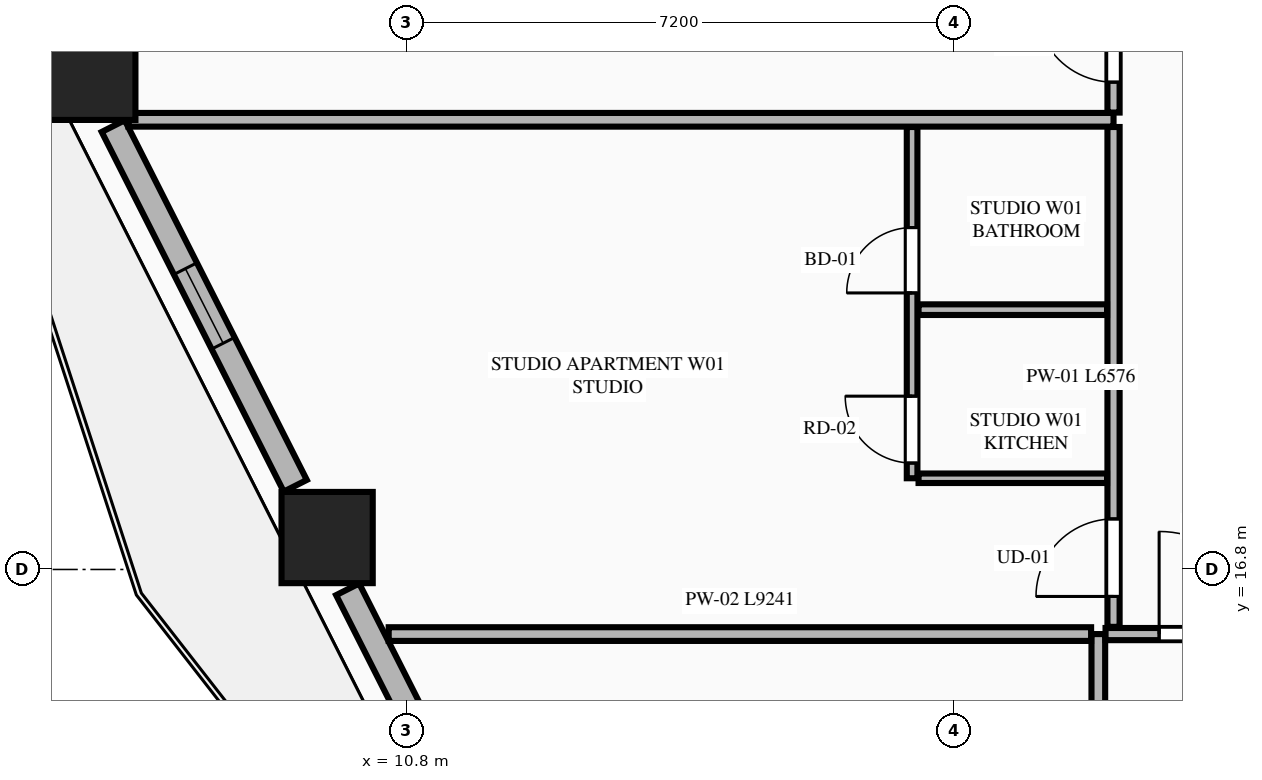
"""IFC4 building model, lengths in metres.
Left out: names, types, materials, properties, quantities, classifications, styles, units other than length and angle.
Written with IfcOpenShell. Run it as: python <this file> out.ifc"""

import sys

from ifc_helpers import new_model, si_unit, direction, frame, frame_2d, origin, origin_2d, place, context, subcontext, project, spatial, rectangle, extrude, element, fill, save


model = new_model("IFC4")
c1 = context("Model", 3, precision=1e-05, world=origin(), true_north=direction((0.0, 1.0)))
c2 = subcontext(c1, "Body", "Model", "MODEL_VIEW")
j1 = project(units=[si_unit("LENGTHUNIT", "METRE"), si_unit("PLANEANGLEUNIT", "RADIAN")], contexts=[c1])
p1 = place(None, origin())
s1 = spatial("IfcSite", under=j1, at=p1, CompositionType="ELEMENT")
p2 = place(p1, origin())
s2 = spatial("IfcBuilding", under=s1, at=p2, CompositionType="ELEMENT")
p3 = place(p2, frame((0.0, 0.0, 67.5)))
s3 = spatial("IfcBuildingStorey", under=s2, at=p3, CompositionType="ELEMENT", Elevation=67.5)
for number, where, z_axis, x_axis in (
    (1, (6.632, 23.314, 0.0), (0.0, 0.0, 1.0), (1.0, 0.0, 0.0)),
    (2, (9.754, 17.22, 0.0), (0.0, 0.0, 1.0), (1.0, 0.0, 0.0)),
):
    element("IfcColumn", number, at=place(p3, frame(where, z_axis=z_axis, x_axis=x_axis)), inside=s3, PredefinedType="COLUMN", context=c2, shape_type="SweptSolid", body=[
        extrude(rectangle(XDim=1.2, YDim=1.2, at=origin_2d()), origin(), (0.0, 0.0, 1.0), 3.55),
    ])
p4 = place(p3, frame((6.94, 22.633, 0.0), z_axis=(0.0, 0.0, 1.0), x_axis=(0.451572088722, -0.892234637686, 0.0)))
e3 = element("IfcWall", 3, at=p4, inside=s3, PredefinedType="STANDARD", context=c2, shape_type="SweptSolid", body=[
    extrude(rectangle(XDim=5.304, YDim=0.34, at=frame_2d((2.652, 0.0))), origin(), (0.0, 0.0, 1.0), 2.787),
])
p5 = place(p4, frame((2.102, 0.0, 0.75)))
e4 = element("IfcOpeningElement", 4, at=p5, cuts=e3, PredefinedType="OPENING", context=c2, shape_type="SweptSolid", body=[
    extrude(rectangle(XDim=1.1, YDim=1.887, at=frame_2d((0.55, 0.943))), frame((0.0, 0.18, 0.0), z_axis=(0.0, -1.0, 0.0), x_axis=(1.0, 0.0, 0.0)), (0.0, 0.0, 1.0), 0.36),
])
p6 = place(p3, frame((10.024, 16.539, 0.0), z_axis=(0.0, 0.0, 1.0), x_axis=(0.451627137896, -0.892206774417, 0.0)))
e5 = element("IfcWall", 5, at=p6, inside=s3, PredefinedType="STANDARD", context=c2, shape_type="SweptSolid", body=[
    extrude(rectangle(XDim=5.547, YDim=0.34, at=frame_2d((2.773, 0.0))), origin(), (0.0, 0.0, 1.0), 2.787),
])
p7 = place(p6, frame((2.679, 0.0, 0.0)))
e6 = element("IfcOpeningElement", 6, at=p7, cuts=e5, PredefinedType="OPENING", context=c2, shape_type="SweptSolid", body=[
    extrude(rectangle(XDim=1.1, YDim=2.25, at=frame_2d((0.55, 1.125))), frame((0.0, 0.18, 0.0), z_axis=(0.0, -1.0, 0.0), x_axis=(1.0, 0.0, 0.0)), (0.0, 0.0, 1.0), 0.36),
])
p8 = place(p3, frame((19.9, 2.455, 0.0), z_axis=(0.0, 0.0, 1.0), x_axis=(0.0, 1.0, 0.0)))
e7 = element("IfcWall", 7, at=p8, inside=s3, PredefinedType="PARTITIONING", context=c2, shape_type="SweptSolid", body=[
    extrude(rectangle(XDim=13.495, YDim=0.18, at=frame_2d((6.748, 0.0))), origin(), (0.0, 0.0, 1.0), 3.33),
])
p9 = place(p3, frame((19.995, 15.95, 0.0), z_axis=(0.0, 0.0, 1.0), x_axis=(1.0, 0.0, 0.0)))
e8 = element("IfcWall", 8, at=p9, inside=s3, PredefinedType="PARTITIONING", context=c2, shape_type="SweptSolid", body=[
    extrude(rectangle(XDim=24.81, YDim=0.16, at=frame_2d((12.405, 0.0))), origin(), (0.0, 0.0, 1.0), 3.33),
])
p10 = place(p9, frame((0.705, 0.0, 0.0)))
e9 = element("IfcOpeningElement", 9, at=p10, cuts=e8, PredefinedType="OPENING", context=c2, shape_type="SweptSolid", body=[
    extrude(rectangle(XDim=1.35, YDim=2.35, at=frame_2d((0.675, 1.175))), frame((0.0, 0.09, 0.0), z_axis=(0.0, -1.0, 0.0), x_axis=(1.0, 0.0, 0.0)), (0.0, 0.0, 1.0), 0.18),
])
p11 = place(p3, frame((10.564, 15.95, 0.0), z_axis=(0.0, 0.0, 1.0), x_axis=(1.0, 0.0, 0.0)))
e10 = element("IfcWall", 10, at=p11, inside=s3, PredefinedType="PARTITIONING", context=c2, shape_type="SweptSolid", body=[
    extrude(rectangle(XDim=9.241, YDim=0.18, at=frame_2d((4.621, 0.0))), origin(), (0.0, 0.0, 1.0), 3.33),
])
p12 = place(p3, frame((20.1, 16.045, 0.0), z_axis=(0.0, 0.0, 1.0), x_axis=(0.0, 1.0, 0.0)))
e11 = element("IfcWall", 11, at=p12, inside=s3, PredefinedType="PARTITIONING", context=c2, shape_type="SweptSolid", body=[
    extrude(rectangle(XDim=6.576, YDim=0.16, at=frame_2d((3.288, 0.0))), origin(), (0.0, 0.0, 1.0), 3.33),
])
p13 = place(p12, frame((0.4, 0.0, 0.0)))
e12 = element("IfcOpeningElement", 12, at=p13, cuts=e11, PredefinedType="OPENING", context=c2, shape_type="SweptSolid", body=[
    extrude(rectangle(XDim=1.02, YDim=2.25, at=frame_2d((0.51, 1.125))), frame((0.0, 0.09, 0.0), z_axis=(0.0, -1.0, 0.0), x_axis=(1.0, 0.0, 0.0)), (0.0, 0.0, 1.0), 0.18),
])
p14 = place(p3, frame((17.535, 18.0, 0.0), z_axis=(0.0, 0.0, 1.0), x_axis=(1.0, 0.0, 0.0)))
e13 = element("IfcWall", 13, at=p14, inside=s3, PredefinedType="PARTITIONING", context=c2, shape_type="SweptSolid", body=[
    extrude(rectangle(XDim=2.48, YDim=0.125, at=frame_2d((1.24, 0.0))), origin(), (0.0, 0.0, 1.0), 2.636),
])
p15 = place(p3, frame((17.45, 18.0, 0.0), z_axis=(0.0, 0.0, 1.0), x_axis=(0.0, 1.0, 0.0)))
e14 = element("IfcWall", 14, at=p15, inside=s3, PredefinedType="PLUMBINGWALL", context=c2, shape_type="SweptSolid", body=[
    extrude(rectangle(XDim=4.621, YDim=0.14, at=frame_2d((2.311, 0.0))), origin(), (0.0, 0.0, 1.0), 3.33),
])
p16 = place(p15, frame((2.438, 0.0, 0.0)))
e15 = element("IfcOpeningElement", 15, at=p16, cuts=e14, PredefinedType="OPENING", context=c2, shape_type="SweptSolid", body=[
    extrude(rectangle(XDim=0.86, YDim=2.1, at=frame_2d((0.43, 1.05))), frame((0.0, 0.08, 0.0), z_axis=(0.0, -1.0, 0.0), x_axis=(1.0, 0.0, 0.0)), (0.0, 0.0, 1.0), 0.16),
])
p17 = place(p15, frame((0.2, 0.0, 0.0)))
e16 = element("IfcOpeningElement", 16, at=p17, cuts=e14, PredefinedType="OPENING", context=c2, shape_type="SweptSolid", body=[
    extrude(rectangle(XDim=0.88, YDim=2.15, at=frame_2d((0.44, 1.075))), frame((0.0, 0.08, 0.0), z_axis=(0.0, -1.0, 0.0), x_axis=(1.0, 0.0, 0.0)), (0.0, 0.0, 1.0), 0.16),
])
p18 = place(p3, frame((17.535, 20.218, 0.0), z_axis=(0.0, 0.0, 1.0), x_axis=(1.0, 0.0, 0.0)))
e17 = element("IfcWall", 17, at=p18, inside=s3, PredefinedType="PLUMBINGWALL", context=c2, shape_type="SweptSolid", body=[
    extrude(rectangle(XDim=2.48, YDim=0.14, at=frame_2d((1.24, 0.0))), origin(), (0.0, 0.0, 1.0), 3.33),
])
p19 = place(p3, frame((7.14, 22.716, 0.0), z_axis=(0.0, 0.0, 1.0), x_axis=(1.0, 0.0, 0.0)))
e18 = element("IfcWall", 18, at=p19, inside=s3, PredefinedType="PARTITIONING", context=c2, shape_type="SweptSolid", body=[
    extrude(rectangle(XDim=12.96, YDim=0.18, at=frame_2d((6.48, 0.0))), origin(), (0.0, 0.0, 1.0), 3.33),
])
p20 = place(p3, frame((20.1, 22.811, 0.0), z_axis=(0.0, 0.0, 1.0), x_axis=(0.0, 1.0, 0.0)))
e19 = element("IfcWall", 19, at=p20, inside=s3, PredefinedType="PARTITIONING", context=c2, shape_type="SweptSolid", body=[
    extrude(rectangle(XDim=6.377, YDim=0.16, at=frame_2d((3.188, 0.0))), origin(), (0.0, 0.0, 1.0), 3.33),
])
p21 = place(p20, frame((0.4, 0.0, 0.0)))
e20 = element("IfcOpeningElement", 20, at=p21, cuts=e19, PredefinedType="OPENING", context=c2, shape_type="SweptSolid", body=[
    extrude(rectangle(XDim=1.02, YDim=2.25, at=frame_2d((0.51, 1.125))), frame((0.0, 0.09, 0.0), z_axis=(0.0, -1.0, 0.0), x_axis=(1.0, 0.0, 0.0)), (0.0, 0.0, 1.0), 0.18),
])
p22 = place(p5, origin())
e21 = element("IfcWindow", 21, at=p22, inside=s3, PartitioningType="SINGLE_PANEL", PredefinedType="WINDOW", context=c2, shape_type="SweptSolid", body=[
    extrude(rectangle(XDim=1.1, YDim=1.887, at=frame_2d((0.55, 0.943))), frame((0.0, 0.03, 0.0), z_axis=(0.0, -1.0, 0.0), x_axis=(1.0, 0.0, 0.0)), (0.0, 0.0, 1.0), 0.06),
])
fill(e4, e21)
p23 = place(p10, origin())
e22 = element("IfcDoor", 22, at=p23, inside=s3, OperationType="SINGLE_SWING_LEFT", PredefinedType="DOOR", context=c2, shape_type="SweptSolid", body=[
    extrude(rectangle(XDim=1.35, YDim=2.35, at=frame_2d((0.675, 1.175))), frame((0.0, 0.025, 0.0), z_axis=(0.0, -1.0, 0.0), x_axis=(1.0, 0.0, 0.0)), (0.0, 0.0, 1.0), 0.05),
])
fill(e9, e22)
p24 = place(p16, origin())
e23 = element("IfcDoor", 23, at=p24, inside=s3, OperationType="SINGLE_SWING_LEFT", PredefinedType="DOOR", context=c2, shape_type="SweptSolid", body=[
    extrude(rectangle(XDim=0.86, YDim=2.1, at=frame_2d((0.43, 1.05))), frame((0.0, 0.025, 0.0), z_axis=(0.0, -1.0, 0.0), x_axis=(1.0, 0.0, 0.0)), (0.0, 0.0, 1.0), 0.05),
])
fill(e15, e23)
p25 = place(p13, origin())
e24 = element("IfcDoor", 24, at=p25, inside=s3, OperationType="SINGLE_SWING_LEFT", PredefinedType="DOOR", context=c2, shape_type="SweptSolid", body=[
    extrude(rectangle(XDim=1.02, YDim=2.25, at=frame_2d((0.51, 1.125))), frame((0.0, 0.025, 0.0), z_axis=(0.0, -1.0, 0.0), x_axis=(1.0, 0.0, 0.0)), (0.0, 0.0, 1.0), 0.05),
])
fill(e12, e24)
p26 = place(p17, origin())
e25 = element("IfcDoor", 25, at=p26, inside=s3, OperationType="SINGLE_SWING_RIGHT", PredefinedType="DOOR", context=c2, shape_type="SweptSolid", body=[
    extrude(rectangle(XDim=0.88, YDim=2.15, at=frame_2d((0.44, 1.075))), frame((0.0, 0.025, 0.0), z_axis=(0.0, -1.0, 0.0), x_axis=(1.0, 0.0, 0.0)), (0.0, 0.0, 1.0), 0.05),
])
fill(e16, e25)
p27 = place(p21, origin())
e26 = element("IfcDoor", 26, at=p27, inside=s3, OperationType="SINGLE_SWING_RIGHT", PredefinedType="DOOR", context=c2, shape_type="SweptSolid", body=[
    extrude(rectangle(XDim=1.02, YDim=2.25, at=frame_2d((0.51, 1.125))), frame((0.0, 0.025, 0.0), z_axis=(0.0, -1.0, 0.0), x_axis=(1.0, 0.0, 0.0)), (0.0, 0.0, 1.0), 0.05),
])
fill(e20, e26)
save(model, sys.argv[1])
